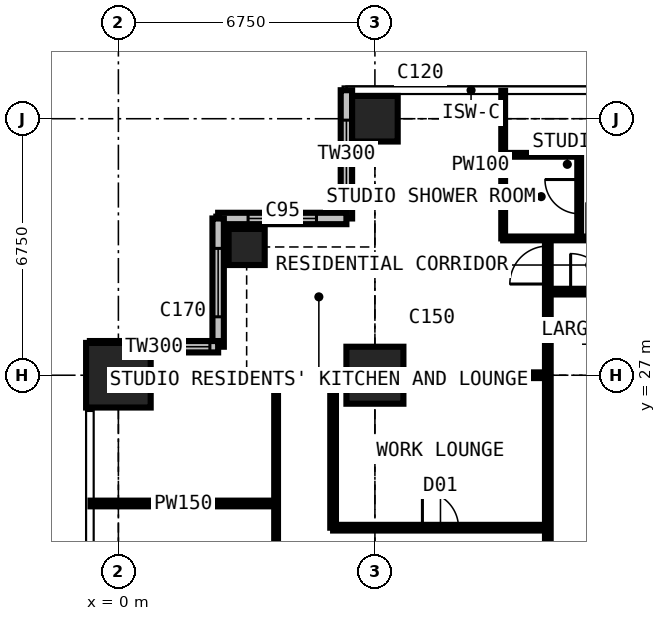
"""IFC4 building model, lengths in metres.
Left out: names, types, materials, properties, quantities, classifications, styles, units other than length and angle.
Written with IfcOpenShell. Run it as: python <this file> out.ifc"""

import sys

from ifc_helpers import new_model, si_unit, direction, frame, frame_2d, origin, origin_2d, place, context, subcontext, project, spatial, rectangle, extrude, element, fill, save


model = new_model("IFC4")
c1 = context("Model", 3, precision=1e-05, world=origin(), true_north=direction((0.0, 1.0)))
c2 = subcontext(c1, "Body", "Model", "MODEL_VIEW")
j1 = project(units=[si_unit("LENGTHUNIT", "METRE"), si_unit("PLANEANGLEUNIT", "RADIAN")], contexts=[c1])
p1 = place(None, origin())
s1 = spatial("IfcSite", under=j1, at=p1, CompositionType="ELEMENT")
p2 = place(p1, origin())
s2 = spatial("IfcBuilding", under=s1, at=p2, CompositionType="ELEMENT")
p3 = place(p2, frame((0.0, 0.0, 196.2)))
s3 = spatial("IfcBuildingStorey", under=s2, at=p3, CompositionType="ELEMENT", Elevation=196.2)
p4 = place(p3, frame((0.0, 27.0, 0.0), z_axis=(0.0, 0.0, 1.0), x_axis=(1.0, 0.0, 0.0)))
e1 = element("IfcColumn", 1, at=p4, inside=s3, PredefinedType="COLUMN", context=c2, shape_type="SweptSolid", body=[
    extrude(rectangle(XDim=1.7, YDim=1.7, at=origin_2d()), origin(), (0.0, 0.0, 1.0), 3.6),
])
p5 = place(p3, frame((3.375, 30.375, 0.0), z_axis=(0.0, 0.0, 1.0), x_axis=(1.0, 0.0, 0.0)))
e2 = element("IfcColumn", 2, at=p5, inside=s3, PredefinedType="COLUMN", context=c2, shape_type="SweptSolid", body=[
    extrude(rectangle(XDim=0.95, YDim=0.95, at=origin_2d()), origin(), (0.0, 0.0, 1.0), 3.6),
])
p6 = place(p3, frame((6.75, 27.0, 0.0), z_axis=(0.0, 0.0, 1.0), x_axis=(1.0, 0.0, 0.0)))
e3 = element("IfcColumn", 3, at=p6, inside=s3, PredefinedType="COLUMN", context=c2, shape_type="SweptSolid", body=[
    extrude(rectangle(XDim=1.5, YDim=1.5, at=origin_2d()), origin(), (0.0, 0.0, 1.0), 3.6),
])
p7 = place(p3, frame((6.75, 33.75, 0.0), z_axis=(0.0, 0.0, 1.0), x_axis=(1.0, 0.0, 0.0)))
e4 = element("IfcColumn", 4, at=p7, inside=s3, PredefinedType="COLUMN", context=c2, shape_type="SweptSolid", body=[
    extrude(rectangle(XDim=1.2, YDim=1.2, at=origin_2d()), origin(), (0.0, 0.0, 1.0), 3.6),
])
p8 = place(p3, frame((6.0, 34.5, 0.0), z_axis=(0.0, 0.0, 1.0), x_axis=(0.0, -1.0, 0.0)))
e5 = element("IfcWall", 5, at=p8, inside=s3, PredefinedType="SOLIDWALL", context=c2, shape_type="SweptSolid", body=[
    extrude(rectangle(XDim=3.375, YDim=0.3, at=frame_2d((1.688, 0.0))), origin(), (0.0, 0.0, 1.0), 3.3),
])
p9 = place(p8, frame((0.788, 0.0, 0.6)))
e6 = element("IfcOpeningElement", 6, at=p9, cuts=e5, PredefinedType="OPENING", context=c2, shape_type="SweptSolid", body=[
    extrude(rectangle(XDim=1.8, YDim=2.1, at=frame_2d((0.9, 1.05))), frame((0.0, 0.16, 0.0), z_axis=(0.0, -1.0, 0.0), x_axis=(1.0, 0.0, 0.0)), (0.0, 0.0, 1.0), 0.32),
])
p10 = place(p3, frame((6.0, 31.125, 0.0), z_axis=(0.0, 0.0, 1.0), x_axis=(-1.0, 0.0, 0.0)))
e7 = element("IfcWall", 7, at=p10, inside=s3, PredefinedType="SOLIDWALL", context=c2, shape_type="SweptSolid", body=[
    extrude(rectangle(XDim=3.375, YDim=0.3, at=frame_2d((1.688, 0.0))), origin(), (0.0, 0.0, 1.0), 3.3),
])
p11 = place(p10, frame((0.788, 0.0, 0.6)))
e8 = element("IfcOpeningElement", 8, at=p11, cuts=e7, PredefinedType="OPENING", context=c2, shape_type="SweptSolid", body=[
    extrude(rectangle(XDim=1.8, YDim=2.1, at=frame_2d((0.9, 1.05))), frame((0.0, 0.16, 0.0), z_axis=(0.0, -1.0, 0.0), x_axis=(1.0, 0.0, 0.0)), (0.0, 0.0, 1.0), 0.32),
])
p12 = place(p3, frame((2.625, 31.125, 0.0), z_axis=(0.0, 0.0, 1.0), x_axis=(0.0, -1.0, 0.0)))
e9 = element("IfcWall", 9, at=p12, inside=s3, PredefinedType="SOLIDWALL", context=c2, shape_type="SweptSolid", body=[
    extrude(rectangle(XDim=3.375, YDim=0.3, at=frame_2d((1.688, 0.0))), origin(), (0.0, 0.0, 1.0), 3.3),
])
p13 = place(p12, frame((0.788, 0.0, 0.6)))
e10 = element("IfcOpeningElement", 10, at=p13, cuts=e9, PredefinedType="OPENING", context=c2, shape_type="SweptSolid", body=[
    extrude(rectangle(XDim=1.8, YDim=2.1, at=frame_2d((0.9, 1.05))), frame((0.0, 0.16, 0.0), z_axis=(0.0, -1.0, 0.0), x_axis=(1.0, 0.0, 0.0)), (0.0, 0.0, 1.0), 0.32),
])
p14 = place(p3, frame((2.625, 27.75, 0.0), z_axis=(0.0, 0.0, 1.0), x_axis=(-1.0, 0.0, 0.0)))
e11 = element("IfcWall", 11, at=p14, inside=s3, PredefinedType="SOLIDWALL", context=c2, shape_type="SweptSolid", body=[
    extrude(rectangle(XDim=3.375, YDim=0.3, at=frame_2d((1.688, 0.0))), origin(), (0.0, 0.0, 1.0), 3.3),
])
p15 = place(p14, frame((0.218, 0.0, 0.9)))
e12 = element("IfcOpeningElement", 12, at=p15, cuts=e11, PredefinedType="OPENING", context=c2, shape_type="SweptSolid", body=[
    extrude(rectangle(XDim=1.5, YDim=1.8, at=frame_2d((0.75, 0.9))), frame((0.0, 0.16, 0.0), z_axis=(0.0, -1.0, 0.0), x_axis=(1.0, 0.0, 0.0)), (0.0, 0.0, 1.0), 0.32),
])
p16 = place(p3, frame((-0.734, 23.625, 0.0), z_axis=(0.0, 0.0, 1.0), x_axis=(1.0, 0.0, 0.0)))
e13 = element("IfcWall", 13, at=p16, inside=s3, PredefinedType="PARTITIONING", context=c2, shape_type="SweptSolid", body=[
    extrude(rectangle(XDim=4.884, YDim=0.15, at=frame_2d((2.442, 0.0))), origin(), (0.0, 0.0, 1.0), 3.3),
])
p17 = place(p3, frame((4.15, 10.125, 0.0), z_axis=(0.0, 0.0, 1.0), x_axis=(0.0, 1.0, 0.0)))
e14 = element("IfcWall", 14, at=p17, inside=s3, PredefinedType="PARTITIONING", context=c2, shape_type="SweptSolid", body=[
    extrude(rectangle(XDim=16.875, YDim=0.1, at=frame_2d((8.438, 0.0))), origin(), (0.0, 0.0, 1.0), 3.3),
])
p18 = place(p17, frame((4.2, 0.0, 0.0)))
e15 = element("IfcOpeningElement", 15, at=p18, cuts=e14, PredefinedType="OPENING", context=c2, shape_type="SweptSolid", body=[
    extrude(rectangle(XDim=0.95, YDim=2.2, at=frame_2d((0.475, 1.1))), frame((0.0, 0.06, 0.0), z_axis=(0.0, -1.0, 0.0), x_axis=(1.0, 0.0, 0.0)), (0.0, 0.0, 1.0), 0.12),
])
p19 = place(p17, frame((10.95, 0.0, 0.0)))
e16 = element("IfcOpeningElement", 16, at=p19, cuts=e14, PredefinedType="OPENING", context=c2, shape_type="SweptSolid", body=[
    extrude(rectangle(XDim=0.95, YDim=2.2, at=frame_2d((0.475, 1.1))), frame((0.0, 0.06, 0.0), z_axis=(0.0, -1.0, 0.0), x_axis=(1.0, 0.0, 0.0)), (0.0, 0.0, 1.0), 0.12),
])
p20 = place(p3, frame((4.15, 27.0, 0.0), z_axis=(0.0, 0.0, 1.0), x_axis=(1.0, 0.0, 0.0)))
e17 = element("IfcWall", 17, at=p20, inside=s3, PredefinedType="PARTITIONING", context=c2, shape_type="SweptSolid", body=[
    extrude(rectangle(XDim=7.15, YDim=0.15, at=frame_2d((3.575, 0.0))), origin(), (0.0, 0.0, 1.0), 2.802),
])
p21 = place(p3, frame((5.65, 22.988, 0.0), z_axis=(0.0, 0.0, 1.0), x_axis=(0.0, 1.0, 0.0)))
e18 = element("IfcWall", 18, at=p21, inside=s3, PredefinedType="PARTITIONING", context=c2, shape_type="SweptSolid", body=[
    extrude(rectangle(XDim=4.012, YDim=0.15, at=frame_2d((2.006, 0.0))), origin(), (0.0, 0.0, 1.0), 3.3),
])
p22 = place(p3, frame((5.65, 22.988, 0.0), z_axis=(0.0, 0.0, 1.0), x_axis=(1.0, 0.0, 0.0)))
e19 = element("IfcWall", 19, at=p22, inside=s3, PredefinedType="PARTITIONING", context=c2, shape_type="SweptSolid", body=[
    extrude(rectangle(XDim=5.65, YDim=0.15, at=frame_2d((2.825, 0.0))), origin(), (0.0, 0.0, 1.0), 3.3),
])
p23 = place(p22, frame((2.35, 0.0, 0.0)))
e20 = element("IfcOpeningElement", 20, at=p23, cuts=e19, PredefinedType="OPENING", context=c2, shape_type="SweptSolid", body=[
    extrude(rectangle(XDim=0.95, YDim=2.2, at=frame_2d((0.475, 1.1))), frame((0.0, 0.085, 0.0), z_axis=(0.0, -1.0, 0.0), x_axis=(1.0, 0.0, 0.0)), (0.0, 0.0, 1.0), 0.17),
])
p24 = place(p3, frame((10.125, 30.6, 0.0), z_axis=(0.0, 0.0, 1.0), x_axis=(0.0, 1.0, 0.0)))
e21 = element("IfcWall", 21, at=p24, inside=s3, PredefinedType="PARTITIONING", context=c2, shape_type="SweptSolid", body=[
    extrude(rectangle(XDim=3.884, YDim=0.1, at=frame_2d((1.942, 0.0))), origin(), (0.0, 0.0, 1.0), 3.3),
])
p25 = place(p3, frame((10.125, 30.6, 0.0), z_axis=(0.0, 0.0, 1.0), x_axis=(1.0, 0.0, 0.0)))
e22 = element("IfcWall", 22, at=p25, inside=s3, PredefinedType="PARTITIONING", context=c2, shape_type="SweptSolid", body=[
    extrude(rectangle(XDim=3.375, YDim=0.1, at=frame_2d((1.688, 0.0))), origin(), (0.0, 0.0, 1.0), 3.3),
])
p26 = place(p25, frame((2.2, 0.0, 0.0)))
e23 = element("IfcOpeningElement", 23, at=p26, cuts=e22, PredefinedType="OPENING", context=c2, shape_type="SweptSolid", body=[
    extrude(rectangle(XDim=0.95, YDim=2.2, at=frame_2d((0.475, 1.1))), frame((0.0, 0.06, 0.0), z_axis=(0.0, -1.0, 0.0), x_axis=(1.0, 0.0, 0.0)), (0.0, 0.0, 1.0), 0.12),
])
p27 = place(p3, frame((10.125, 32.8, 0.0), z_axis=(0.0, 0.0, 1.0), x_axis=(1.0, 0.0, 0.0)))
e24 = element("IfcWall", 24, at=p27, inside=s3, PredefinedType="PARTITIONING", context=c2, shape_type="SweptSolid", body=[
    extrude(rectangle(XDim=2.0, YDim=0.1, at=frame_2d((1.0, 0.0))), origin(), (0.0, 0.0, 1.0), 3.3),
])
p28 = place(p3, frame((11.3, 11.3, 0.0), z_axis=(0.0, 0.0, 1.0), x_axis=(0.0, 1.0, 0.0)))
e25 = element("IfcWall", 25, at=p28, inside=s3, PredefinedType="PARTITIONING", context=c2, shape_type="SweptSolid", body=[
    extrude(rectangle(XDim=19.3, YDim=0.15, at=frame_2d((9.65, 0.0))), origin(), (0.0, 0.0, 1.0), 3.3),
])
p29 = place(p28, frame((18.1, 0.0, 0.0)))
e26 = element("IfcOpeningElement", 26, at=p29, cuts=e25, PredefinedType="OPENING", context=c2, shape_type="SweptSolid", body=[
    extrude(rectangle(XDim=1.0, YDim=2.2, at=frame_2d((0.5, 1.1))), frame((0.0, 0.085, 0.0), z_axis=(0.0, -1.0, 0.0), x_axis=(1.0, 0.0, 0.0)), (0.0, 0.0, 1.0), 0.17),
])
p30 = place(p28, frame((10.137, 0.0, 0.0)))
e27 = element("IfcOpeningElement", 27, at=p30, cuts=e25, PredefinedType="OPENING", context=c2, shape_type="SweptSolid", body=[
    extrude(rectangle(XDim=1.0, YDim=2.2, at=frame_2d((0.5, 1.1))), frame((0.0, 0.085, 0.0), z_axis=(0.0, -1.0, 0.0), x_axis=(1.0, 0.0, 0.0)), (0.0, 0.0, 1.0), 0.17),
])
p31 = place(p3, frame((11.3, 29.2, 0.0), z_axis=(0.0, 0.0, 1.0), x_axis=(1.0, 0.0, 0.0)))
e28 = element("IfcWall", 28, at=p31, inside=s3, PredefinedType="PARTITIONING", context=c2, shape_type="SweptSolid", body=[
    extrude(rectangle(XDim=19.809, YDim=0.15, at=frame_2d((9.904, 0.0))), origin(), (0.0, 0.0, 1.0), 3.3),
])
p32 = place(p31, frame((12.9, 0.0, 0.0)))
e29 = element("IfcOpeningElement", 29, at=p32, cuts=e28, PredefinedType="OPENING", context=c2, shape_type="SweptSolid", body=[
    extrude(rectangle(XDim=1.0, YDim=2.2, at=frame_2d((0.5, 1.1))), frame((0.0, 0.085, 0.0), z_axis=(0.0, -1.0, 0.0), x_axis=(1.0, 0.0, 0.0)), (0.0, 0.0, 1.0), 0.17),
])
p33 = place(p31, frame((6.4, 0.0, 0.0)))
e30 = element("IfcOpeningElement", 30, at=p33, cuts=e28, PredefinedType="OPENING", context=c2, shape_type="SweptSolid", body=[
    extrude(rectangle(XDim=0.95, YDim=2.2, at=frame_2d((0.475, 1.1))), frame((0.0, 0.085, 0.0), z_axis=(0.0, -1.0, 0.0), x_axis=(1.0, 0.0, 0.0)), (0.0, 0.0, 1.0), 0.17),
])
p34 = place(p31, frame((0.6, 0.0, 0.0)))
e31 = element("IfcOpeningElement", 31, at=p34, cuts=e28, PredefinedType="OPENING", context=c2, shape_type="SweptSolid", body=[
    extrude(rectangle(XDim=1.0, YDim=2.2, at=frame_2d((0.5, 1.1))), frame((0.0, 0.085, 0.0), z_axis=(0.0, -1.0, 0.0), x_axis=(1.0, 0.0, 0.0)), (0.0, 0.0, 1.0), 0.17),
])
p35 = place(p3, frame((12.125, 30.6, 0.0), z_axis=(0.0, 0.0, 1.0), x_axis=(0.0, 1.0, 0.0)))
e32 = element("IfcWall", 32, at=p35, inside=s3, PredefinedType="PARTITIONING", context=c2, shape_type="SweptSolid", body=[
    extrude(rectangle(XDim=2.2, YDim=0.1, at=frame_2d((1.1, 0.0))), origin(), (0.0, 0.0, 1.0), 3.3),
])
p36 = place(p35, frame((0.65, 0.0, 0.0)))
e33 = element("IfcOpeningElement", 33, at=p36, cuts=e32, PredefinedType="OPENING", context=c2, shape_type="SweptSolid", body=[
    extrude(rectangle(XDim=0.9, YDim=2.2, at=frame_2d((0.45, 1.1))), frame((0.0, 0.06, 0.0), z_axis=(0.0, -1.0, 0.0), x_axis=(1.0, 0.0, 0.0)), (0.0, 0.0, 1.0), 0.12),
])
p37 = place(p9, origin())
e34 = element("IfcWindow", 34, at=p37, inside=s3, PartitioningType="SINGLE_PANEL", PredefinedType="WINDOW", context=c2, shape_type="SweptSolid", body=[
    extrude(rectangle(XDim=1.8, YDim=2.1, at=frame_2d((0.9, 1.05))), frame((0.0, 0.03, 0.0), z_axis=(0.0, -1.0, 0.0), x_axis=(1.0, 0.0, 0.0)), (0.0, 0.0, 1.0), 0.06),
])
fill(e6, e34)
p38 = place(p11, origin())
e35 = element("IfcWindow", 35, at=p38, inside=s3, PartitioningType="SINGLE_PANEL", PredefinedType="WINDOW", context=c2, shape_type="SweptSolid", body=[
    extrude(rectangle(XDim=1.8, YDim=2.1, at=frame_2d((0.9, 1.05))), frame((0.0, 0.03, 0.0), z_axis=(0.0, -1.0, 0.0), x_axis=(1.0, 0.0, 0.0)), (0.0, 0.0, 1.0), 0.06),
])
fill(e8, e35)
p39 = place(p13, origin())
e36 = element("IfcWindow", 36, at=p39, inside=s3, PartitioningType="SINGLE_PANEL", PredefinedType="WINDOW", context=c2, shape_type="SweptSolid", body=[
    extrude(rectangle(XDim=1.8, YDim=2.1, at=frame_2d((0.9, 1.05))), frame((0.0, 0.03, 0.0), z_axis=(0.0, -1.0, 0.0), x_axis=(1.0, 0.0, 0.0)), (0.0, 0.0, 1.0), 0.06),
])
fill(e10, e36)
p40 = place(p15, origin())
e37 = element("IfcWindow", 37, at=p40, inside=s3, PartitioningType="SINGLE_PANEL", PredefinedType="WINDOW", context=c2, shape_type="SweptSolid", body=[
    extrude(rectangle(XDim=1.5, YDim=1.8, at=frame_2d((0.75, 0.9))), frame((0.0, 0.03, 0.0), z_axis=(0.0, -1.0, 0.0), x_axis=(1.0, 0.0, 0.0)), (0.0, 0.0, 1.0), 0.06),
])
fill(e12, e37)
p41 = place(p36, origin())
e38 = element("IfcDoor", 38, at=p41, inside=s3, OperationType="SINGLE_SWING_RIGHT", PredefinedType="DOOR", context=c2, shape_type="SweptSolid", body=[
    extrude(rectangle(XDim=0.9, YDim=2.2, at=frame_2d((0.45, 1.1))), frame((0.0, 0.025, 0.0), z_axis=(0.0, -1.0, 0.0), x_axis=(1.0, 0.0, 0.0)), (0.0, 0.0, 1.0), 0.05),
])
fill(e33, e38)
p42 = place(p34, origin())
e39 = element("IfcDoor", 39, at=p42, inside=s3, OperationType="SINGLE_SWING_LEFT", PredefinedType="DOOR", context=c2, shape_type="SweptSolid", body=[
    extrude(rectangle(XDim=1.0, YDim=2.2, at=frame_2d((0.5, 1.1))), frame((0.0, 0.025, 0.0), z_axis=(0.0, -1.0, 0.0), x_axis=(1.0, 0.0, 0.0)), (0.0, 0.0, 1.0), 0.05),
])
fill(e31, e39)
p43 = place(p29, origin())
e40 = element("IfcDoor", 40, at=p43, inside=s3, OperationType="SINGLE_SWING_LEFT", PredefinedType="DOOR", context=c2, shape_type="SweptSolid", body=[
    extrude(rectangle(XDim=1.0, YDim=2.2, at=frame_2d((0.5, 1.1))), frame((0.0, 0.025, 0.0), z_axis=(0.0, -1.0, 0.0), x_axis=(1.0, 0.0, 0.0)), (0.0, 0.0, 1.0), 0.05),
])
fill(e26, e40)
p44 = place(p23, origin())
e41 = element("IfcDoor", 41, at=p44, inside=s3, OperationType="SINGLE_SWING_LEFT", PredefinedType="DOOR", context=c2, shape_type="SweptSolid", body=[
    extrude(rectangle(XDim=0.95, YDim=2.2, at=frame_2d((0.475, 1.1))), frame((0.0, 0.025, 0.0), z_axis=(0.0, -1.0, 0.0), x_axis=(1.0, 0.0, 0.0)), (0.0, 0.0, 1.0), 0.05),
])
fill(e20, e41)
save(model, sys.argv[1])
